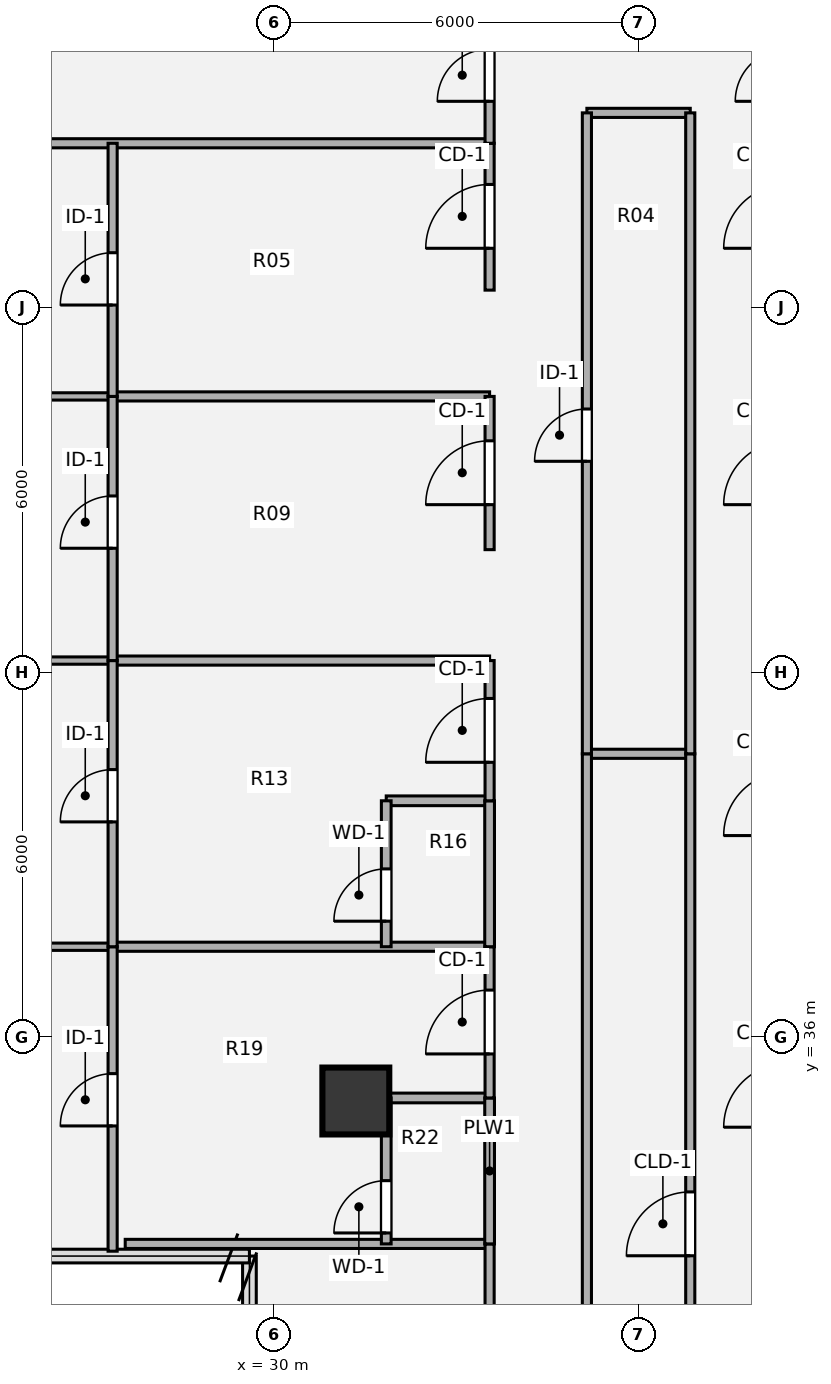
"""IFC4 building model, lengths in metres.
Left out: names, types, materials, properties, quantities, classifications, styles, units other than length and angle.
Written with IfcOpenShell. Run it as: python <this file> out.ifc"""

import sys

from ifc_helpers import new_model, si_unit, direction, frame, frame_2d, origin, origin_2d, place, context, subcontext, project, spatial, rectangle, hollow_circle, extrude, source, transform, mapped, element, fill, save


model = new_model("IFC4")
c1 = context("Model", 3, precision=1e-05, world=origin(), true_north=direction((0.0, 1.0)))
c2 = subcontext(c1, "Body", "Model", "MODEL_VIEW")
j1 = project(units=[si_unit("LENGTHUNIT", "METRE"), si_unit("PLANEANGLEUNIT", "RADIAN")], contexts=[c1])
p1 = place(None, origin())
s1 = spatial("IfcSite", under=j1, at=p1, CompositionType="ELEMENT")
p2 = place(p1, origin())
s2 = spatial("IfcBuilding", under=s1, at=p2, CompositionType="ELEMENT")
p3 = place(p2, frame((0.0, 0.0, 194.22)))
s3 = spatial("IfcBuildingStorey", under=s2, at=p3, CompositionType="ELEMENT", Elevation=194.22)
m1 = source(origin(), c2, "Body", "SweptSolid", [
    extrude(hollow_circle(Radius=0.55, WallThickness=0.04, at=origin_2d()), origin(), (0.0, 0.0, 1.0), 3.78),
])
p4 = place(p3, frame((31.35, 34.95, 0.0), z_axis=(0.0, 0.0, 1.0), x_axis=(1.0, 0.0, 0.0)))
e1 = element("IfcColumn", 1, at=p4, inside=s3, PredefinedType="COLUMN", context=c2, shape_type="MappedRepresentation", body=[
    mapped(m1, transform((0.0, 0.0, 0.0), x_axis=(1.0, 0.0, 0.0), y_axis=(0.0, 1.0, 0.0), z_axis=(0.0, 0.0, 1.0), scale=1.0)),
])
p5 = place(p3, frame((27.557, 32.6, 0.0), z_axis=(0.0, 0.0, 1.0), x_axis=(1.0, 0.0, 0.0)))
e2 = element("IfcWall", 2, at=p5, inside=s3, PredefinedType="PARTITIONING", context=c2, shape_type="SweptSolid", body=[
    extrude(rectangle(XDim=5.993, YDim=0.15, at=frame_2d((2.997, 0.0))), origin(), (0.0, 0.0, 1.0), 3.5),
])
p6 = place(p3, frame((31.85, 35.0, 0.0), z_axis=(0.0, 0.0, 1.0), x_axis=(1.0, 0.0, 0.0)))
e3 = element("IfcWall", 3, at=p6, inside=s3, PredefinedType="PLUMBINGWALL", context=c2, shape_type="SweptSolid", body=[
    extrude(rectangle(XDim=1.7, YDim=0.16, at=frame_2d((0.85, 0.0))), origin(), (0.0, 0.0, 1.0), 2.903),
])
p7 = place(p3, frame((15.88, 37.487, 0.0), z_axis=(0.0, 0.0, 1.0), x_axis=(1.0, 0.0, 0.0)))
e4 = element("IfcWall", 4, at=p7, inside=s3, PredefinedType="PARTITIONING", context=c2, shape_type="SweptSolid", body=[
    extrude(rectangle(XDim=11.47, YDim=0.12, at=frame_2d((5.735, 0.0))), origin(), (0.0, 0.0, 1.0), 3.055),
])
p8 = place(p3, frame((27.35, 37.487, 0.0), z_axis=(0.0, 0.0, 1.0), x_axis=(1.0, 0.0, 0.0)))
e5 = element("IfcWall", 5, at=p8, inside=s3, PredefinedType="PARTITIONING", context=c2, shape_type="SweptSolid", body=[
    extrude(rectangle(XDim=6.2, YDim=0.15, at=frame_2d((3.1, 0.0))), origin(), (0.0, 0.0, 1.0), 3.055),
])
p9 = place(p3, frame((31.85, 39.887, 0.0), z_axis=(0.0, 0.0, 1.0), x_axis=(1.0, 0.0, 0.0)))
e6 = element("IfcWall", 6, at=p9, inside=s3, PredefinedType="PLUMBINGWALL", context=c2, shape_type="SweptSolid", body=[
    extrude(rectangle(XDim=1.7, YDim=0.16, at=frame_2d((0.85, 0.0))), origin(), (0.0, 0.0, 1.0), 3.259),
])
p10 = place(p3, frame((35.15, 40.66, 0.0), z_axis=(0.0, 0.0, 1.0), x_axis=(1.0, 0.0, 0.0)))
e7 = element("IfcWall", 7, at=p10, inside=s3, PredefinedType="PARTITIONING", context=c2, shape_type="SweptSolid", body=[
    extrude(rectangle(XDim=1.7, YDim=0.15, at=frame_2d((0.85, 0.0))), origin(), (0.0, 0.0, 1.0), 3.259),
])
p11 = place(p3, frame((15.88, 42.193, 0.0), z_axis=(0.0, 0.0, 1.0), x_axis=(1.0, 0.0, 0.0)))
e8 = element("IfcWall", 8, at=p11, inside=s3, PredefinedType="PARTITIONING", context=c2, shape_type="SweptSolid", body=[
    extrude(rectangle(XDim=11.47, YDim=0.12, at=frame_2d((5.735, 0.0))), origin(), (0.0, 0.0, 1.0), 2.982),
])
p12 = place(p3, frame((27.35, 42.193, 0.0), z_axis=(0.0, 0.0, 1.0), x_axis=(1.0, 0.0, 0.0)))
e9 = element("IfcWall", 9, at=p12, inside=s3, PredefinedType="PARTITIONING", context=c2, shape_type="SweptSolid", body=[
    extrude(rectangle(XDim=6.2, YDim=0.15, at=frame_2d((3.1, 0.0))), origin(), (0.0, 0.0, 1.0), 2.982),
])
p13 = place(p3, frame((15.88, 46.537, 0.0), z_axis=(0.0, 0.0, 1.0), x_axis=(1.0, 0.0, 0.0)))
e10 = element("IfcWall", 10, at=p13, inside=s3, PredefinedType="PARTITIONING", context=c2, shape_type="SweptSolid", body=[
    extrude(rectangle(XDim=11.47, YDim=0.12, at=frame_2d((5.735, 0.0))), origin(), (0.0, 0.0, 1.0), 3.5),
])
p14 = place(p3, frame((27.35, 46.537, 0.0), z_axis=(0.0, 0.0, 1.0), x_axis=(1.0, 0.0, 0.0)))
e11 = element("IfcWall", 11, at=p14, inside=s3, PredefinedType="PARTITIONING", context=c2, shape_type="SweptSolid", body=[
    extrude(rectangle(XDim=6.2, YDim=0.15, at=frame_2d((3.1, 0.0))), origin(), (0.0, 0.0, 1.0), 3.259),
])
p15 = place(p3, frame((15.981, 50.7, 0.0), z_axis=(0.0, 0.0, 1.0), x_axis=(1.0, 0.0, 0.0)))
e12 = element("IfcWall", 12, at=p15, inside=s3, PredefinedType="PARTITIONING", context=c2, shape_type="SweptSolid", body=[
    extrude(rectangle(XDim=17.569, YDim=0.15, at=frame_2d((8.785, 0.0))), origin(), (0.0, 0.0, 1.0), 3.308),
])
p16 = place(p3, frame((35.15, 51.2, 0.0), z_axis=(0.0, 0.0, 1.0), x_axis=(1.0, 0.0, 0.0)))
e13 = element("IfcWall", 13, at=p16, inside=s3, PredefinedType="PARTITIONING", context=c2, shape_type="SweptSolid", body=[
    extrude(rectangle(XDim=1.7, YDim=0.15, at=frame_2d((0.85, 0.0))), origin(), (0.0, 0.0, 1.0), 3.308),
])
p17 = place(p3, frame((27.35, 32.48, 0.0), z_axis=(0.0, 0.0, 1.0), x_axis=(0.0, 1.0, 0.0)))
e14 = element("IfcWall", 14, at=p17, inside=s3, PredefinedType="PARTITIONING", context=c2, shape_type="SweptSolid", body=[
    extrude(rectangle(XDim=5.007, YDim=0.15, at=frame_2d((2.503, 0.0))), origin(), (0.0, 0.0, 1.0), 3.5),
])
p18 = place(p17, frame((2.06, 0.0, 0.0)))
e15 = element("IfcOpeningElement", 15, at=p18, cuts=e14, PredefinedType="OPENING", context=c2, shape_type="SweptSolid", body=[
    extrude(rectangle(XDim=0.86, YDim=2.1, at=origin_2d()), frame((0.43, 0.085, 1.05), z_axis=(0.0, -1.0, 0.0), x_axis=(1.0, 0.0, 0.0)), (0.0, 0.0, 1.0), 0.17),
])
p19 = place(p3, frame((27.35, 37.487, 0.0), z_axis=(0.0, 0.0, 1.0), x_axis=(0.0, 1.0, 0.0)))
e16 = element("IfcWall", 16, at=p19, inside=s3, PredefinedType="PARTITIONING", context=c2, shape_type="SweptSolid", body=[
    extrude(rectangle(XDim=4.706, YDim=0.15, at=frame_2d((2.353, 0.0))), origin(), (0.0, 0.0, 1.0), 3.5),
])
p20 = place(p19, frame((2.053, 0.0, 0.0)))
e17 = element("IfcOpeningElement", 17, at=p20, cuts=e16, PredefinedType="OPENING", context=c2, shape_type="SweptSolid", body=[
    extrude(rectangle(XDim=0.86, YDim=2.1, at=origin_2d()), frame((0.43, 0.085, 1.05), z_axis=(0.0, -1.0, 0.0), x_axis=(1.0, 0.0, 0.0)), (0.0, 0.0, 1.0), 0.17),
])
p21 = place(p3, frame((27.35, 42.193, 0.0), z_axis=(0.0, 0.0, 1.0), x_axis=(0.0, 1.0, 0.0)))
e18 = element("IfcWall", 18, at=p21, inside=s3, PredefinedType="PARTITIONING", context=c2, shape_type="SweptSolid", body=[
    extrude(rectangle(XDim=4.344, YDim=0.15, at=frame_2d((2.172, 0.0))), origin(), (0.0, 0.0, 1.0), 3.5),
])
p22 = place(p21, frame((1.847, 0.0, 0.0)))
e19 = element("IfcOpeningElement", 19, at=p22, cuts=e18, PredefinedType="OPENING", context=c2, shape_type="SweptSolid", body=[
    extrude(rectangle(XDim=0.86, YDim=2.1, at=origin_2d()), frame((0.43, 0.085, 1.05), z_axis=(0.0, -1.0, 0.0), x_axis=(1.0, 0.0, 0.0)), (0.0, 0.0, 1.0), 0.17),
])
p23 = place(p3, frame((27.35, 46.537, 0.0), z_axis=(0.0, 0.0, 1.0), x_axis=(0.0, 1.0, 0.0)))
e20 = element("IfcWall", 20, at=p23, inside=s3, PredefinedType="PARTITIONING", context=c2, shape_type="SweptSolid", body=[
    extrude(rectangle(XDim=4.163, YDim=0.15, at=frame_2d((2.082, 0.0))), origin(), (0.0, 0.0, 1.0), 3.5),
])
p24 = place(p23, frame((1.503, 0.0, 0.0)))
e21 = element("IfcOpeningElement", 21, at=p24, cuts=e20, PredefinedType="OPENING", context=c2, shape_type="SweptSolid", body=[
    extrude(rectangle(XDim=0.86, YDim=2.1, at=origin_2d()), frame((0.43, 0.085, 1.05), z_axis=(0.0, -1.0, 0.0), x_axis=(1.0, 0.0, 0.0)), (0.0, 0.0, 1.0), 0.17),
])
p25 = place(p3, frame((31.85, 32.6, 0.0), z_axis=(0.0, 0.0, 1.0), x_axis=(0.0, 1.0, 0.0)))
e22 = element("IfcWall", 22, at=p25, inside=s3, PredefinedType="PLUMBINGWALL", context=c2, shape_type="SweptSolid", body=[
    extrude(rectangle(XDim=2.4, YDim=0.16, at=frame_2d((1.2, 0.0))), origin(), (0.0, 0.0, 1.0), 3.5),
])
p26 = place(p25, frame((0.18, 0.0, 0.0)))
e23 = element("IfcOpeningElement", 23, at=p26, cuts=e22, PredefinedType="OPENING", context=c2, shape_type="SweptSolid", body=[
    extrude(rectangle(XDim=0.86, YDim=2.1, at=origin_2d()), frame((0.43, 0.09, 1.05), z_axis=(0.0, -1.0, 0.0), x_axis=(1.0, 0.0, 0.0)), (0.0, 0.0, 1.0), 0.18),
])
p27 = place(p3, frame((31.85, 37.487, 0.0), z_axis=(0.0, 0.0, 1.0), x_axis=(0.0, 1.0, 0.0)))
e24 = element("IfcWall", 24, at=p27, inside=s3, PredefinedType="PLUMBINGWALL", context=c2, shape_type="SweptSolid", body=[
    extrude(rectangle(XDim=2.4, YDim=0.16, at=frame_2d((1.2, 0.0))), origin(), (0.0, 0.0, 1.0), 3.5),
])
p28 = place(p27, frame((0.42, 0.0, 0.0)))
e25 = element("IfcOpeningElement", 25, at=p28, cuts=e24, PredefinedType="OPENING", context=c2, shape_type="SweptSolid", body=[
    extrude(rectangle(XDim=0.86, YDim=2.1, at=origin_2d()), frame((0.43, 0.09, 1.05), z_axis=(0.0, -1.0, 0.0), x_axis=(1.0, 0.0, 0.0)), (0.0, 0.0, 1.0), 0.18),
])
p29 = place(p3, frame((33.55, 21.2, 0.0), z_axis=(0.0, 0.0, 1.0), x_axis=(0.0, 1.0, 0.0)))
e26 = element("IfcWall", 26, at=p29, inside=s3, PredefinedType="PARTITIONING", context=c2, shape_type="SweptSolid", body=[
    extrude(rectangle(XDim=11.4, YDim=0.15, at=frame_2d((5.7, 0.0))), origin(), (0.0, 0.0, 1.0), 3.5),
])
p30 = place(p29, frame((5.14, 0.0, 0.0)))
e27 = element("IfcOpeningElement", 27, at=p30, cuts=e26, PredefinedType="OPENING", context=c2, shape_type="SweptSolid", body=[
    extrude(rectangle(XDim=0.86, YDim=2.1, at=origin_2d()), frame((0.43, 0.085, 1.05), z_axis=(0.0, -1.0, 0.0), x_axis=(1.0, 0.0, 0.0)), (0.0, 0.0, 1.0), 0.17),
])
p31 = place(p3, frame((33.55, 32.6, 0.0), z_axis=(0.0, 0.0, 1.0), x_axis=(0.0, 1.0, 0.0)))
e28 = element("IfcWall", 28, at=p31, inside=s3, PredefinedType="PLUMBINGWALL", context=c2, shape_type="SweptSolid", body=[
    extrude(rectangle(XDim=2.4, YDim=0.16, at=frame_2d((1.2, 0.0))), origin(), (0.0, 0.0, 1.0), 3.5),
])
p32 = place(p3, frame((33.55, 35.0, 0.0), z_axis=(0.0, 0.0, 1.0), x_axis=(0.0, 1.0, 0.0)))
e29 = element("IfcWall", 29, at=p32, inside=s3, PredefinedType="PARTITIONING", context=c2, shape_type="SweptSolid", body=[
    extrude(rectangle(XDim=2.487, YDim=0.15, at=frame_2d((1.244, 0.0))), origin(), (0.0, 0.0, 1.0), 3.5),
])
p33 = place(p32, frame((0.724, 0.0, 0.0)))
e30 = element("IfcOpeningElement", 30, at=p33, cuts=e29, PredefinedType="OPENING", context=c2, shape_type="SweptSolid", body=[
    extrude(rectangle(XDim=1.05, YDim=2.1, at=origin_2d()), frame((0.525, 0.085, 1.05), z_axis=(0.0, -1.0, 0.0), x_axis=(1.0, 0.0, 0.0)), (0.0, 0.0, 1.0), 0.17),
])
p34 = place(p3, frame((33.55, 37.487, 0.0), z_axis=(0.0, 0.0, 1.0), x_axis=(0.0, 1.0, 0.0)))
e31 = element("IfcWall", 31, at=p34, inside=s3, PredefinedType="PLUMBINGWALL", context=c2, shape_type="SweptSolid", body=[
    extrude(rectangle(XDim=2.4, YDim=0.16, at=frame_2d((1.2, 0.0))), origin(), (0.0, 0.0, 1.0), 3.5),
])
p35 = place(p3, frame((33.55, 39.887, 0.0), z_axis=(0.0, 0.0, 1.0), x_axis=(0.0, 1.0, 0.0)))
e32 = element("IfcWall", 32, at=p35, inside=s3, PredefinedType="PARTITIONING", context=c2, shape_type="SweptSolid", body=[
    extrude(rectangle(XDim=2.306, YDim=0.15, at=frame_2d((1.153, 0.0))), origin(), (0.0, 0.0, 1.0), 3.5),
])
p36 = place(p35, frame((0.633, 0.0, 0.0)))
e33 = element("IfcOpeningElement", 33, at=p36, cuts=e32, PredefinedType="OPENING", context=c2, shape_type="SweptSolid", body=[
    extrude(rectangle(XDim=1.05, YDim=2.1, at=origin_2d()), frame((0.525, 0.085, 1.05), z_axis=(0.0, -1.0, 0.0), x_axis=(1.0, 0.0, 0.0)), (0.0, 0.0, 1.0), 0.17),
])
p37 = place(p3, frame((33.55, 44.017, 0.0), z_axis=(0.0, 0.0, 1.0), x_axis=(0.0, 1.0, 0.0)))
e34 = element("IfcWall", 34, at=p37, inside=s3, PredefinedType="PARTITIONING", context=c2, shape_type="SweptSolid", body=[
    extrude(rectangle(XDim=2.52, YDim=0.15, at=frame_2d((1.26, 0.0))), origin(), (0.0, 0.0, 1.0), 3.5),
])
p38 = place(p37, frame((0.74, 0.0, 0.0)))
e35 = element("IfcOpeningElement", 35, at=p38, cuts=e34, PredefinedType="OPENING", context=c2, shape_type="SweptSolid", body=[
    extrude(rectangle(XDim=1.05, YDim=2.1, at=origin_2d()), frame((0.525, 0.085, 1.05), z_axis=(0.0, -1.0, 0.0), x_axis=(1.0, 0.0, 0.0)), (0.0, 0.0, 1.0), 0.17),
])
p39 = place(p3, frame((33.55, 48.285, 0.0), z_axis=(0.0, 0.0, 1.0), x_axis=(0.0, 1.0, 0.0)))
e36 = element("IfcWall", 36, at=p39, inside=s3, PredefinedType="PARTITIONING", context=c2, shape_type="SweptSolid", body=[
    extrude(rectangle(XDim=2.415, YDim=0.15, at=frame_2d((1.208, 0.0))), origin(), (0.0, 0.0, 1.0), 3.5),
])
p40 = place(p39, frame((0.688, 0.0, 0.0)))
e37 = element("IfcOpeningElement", 37, at=p40, cuts=e36, PredefinedType="OPENING", context=c2, shape_type="SweptSolid", body=[
    extrude(rectangle(XDim=1.05, YDim=2.1, at=origin_2d()), frame((0.525, 0.085, 1.05), z_axis=(0.0, -1.0, 0.0), x_axis=(1.0, 0.0, 0.0)), (0.0, 0.0, 1.0), 0.17),
])
p41 = place(p3, frame((33.55, 50.7, 0.0), z_axis=(0.0, 0.0, 1.0), x_axis=(0.0, 1.0, 0.0)))
e38 = element("IfcWall", 38, at=p41, inside=s3, PredefinedType="PARTITIONING", context=c2, shape_type="SweptSolid", body=[
    extrude(rectangle(XDim=2.3, YDim=0.15, at=frame_2d((1.15, 0.0))), origin(), (0.0, 0.0, 1.0), 3.5),
])
p42 = place(p41, frame((0.69, 0.0, 0.0)))
e39 = element("IfcOpeningElement", 39, at=p42, cuts=e38, PredefinedType="OPENING", context=c2, shape_type="SweptSolid", body=[
    extrude(rectangle(XDim=0.86, YDim=2.1, at=origin_2d()), frame((0.43, 0.085, 1.05), z_axis=(0.0, -1.0, 0.0), x_axis=(1.0, 0.0, 0.0)), (0.0, 0.0, 1.0), 0.17),
])
p43 = place(p3, frame((35.15, 25.2, 0.0), z_axis=(0.0, 0.0, 1.0), x_axis=(0.0, 1.0, 0.0)))
e40 = element("IfcWall", 40, at=p43, inside=s3, PredefinedType="PARTITIONING", context=c2, shape_type="SweptSolid", body=[
    extrude(rectangle(XDim=15.46, YDim=0.15, at=frame_2d((7.73, 0.0))), origin(), (0.0, 0.0, 1.0), 3.5),
])
p44 = place(p3, frame((35.15, 40.66, 0.0), z_axis=(0.0, 0.0, 1.0), x_axis=(0.0, 1.0, 0.0)))
e41 = element("IfcWall", 41, at=p44, inside=s3, PredefinedType="PARTITIONING", context=c2, shape_type="SweptSolid", body=[
    extrude(rectangle(XDim=10.54, YDim=0.15, at=frame_2d((5.27, 0.0))), origin(), (0.0, 0.0, 1.0), 3.5),
])
p45 = place(p44, frame((4.81, 0.0, 0.0)))
e42 = element("IfcOpeningElement", 42, at=p45, cuts=e41, PredefinedType="OPENING", context=c2, shape_type="SweptSolid", body=[
    extrude(rectangle(XDim=0.86, YDim=2.1, at=origin_2d()), frame((0.43, 0.085, 1.05), z_axis=(0.0, -1.0, 0.0), x_axis=(1.0, 0.0, 0.0)), (0.0, 0.0, 1.0), 0.17),
])
p46 = place(p3, frame((36.85, 25.2, 0.0), z_axis=(0.0, 0.0, 1.0), x_axis=(0.0, 1.0, 0.0)))
e43 = element("IfcWall", 43, at=p46, inside=s3, PredefinedType="PARTITIONING", context=c2, shape_type="SweptSolid", body=[
    extrude(rectangle(XDim=15.46, YDim=0.15, at=frame_2d((7.73, 0.0))), origin(), (0.0, 0.0, 1.0), 3.5),
])
p47 = place(p46, frame((7.205, 0.0, 0.0)))
e44 = element("IfcOpeningElement", 44, at=p47, cuts=e43, PredefinedType="OPENING", context=c2, shape_type="SweptSolid", body=[
    extrude(rectangle(XDim=1.05, YDim=2.1, at=origin_2d()), frame((0.525, 0.085, 1.05), z_axis=(0.0, -1.0, 0.0), x_axis=(1.0, 0.0, 0.0)), (0.0, 0.0, 1.0), 0.17),
])
p48 = place(p3, frame((36.85, 40.66, 0.0), z_axis=(0.0, 0.0, 1.0), x_axis=(0.0, 1.0, 0.0)))
e45 = element("IfcWall", 45, at=p48, inside=s3, PredefinedType="PARTITIONING", context=c2, shape_type="SweptSolid", body=[
    extrude(rectangle(XDim=10.54, YDim=0.15, at=frame_2d((5.27, 0.0))), origin(), (0.0, 0.0, 1.0), 3.5),
])
m2 = source(origin(), c2, "Body", "SweptSolid", [
    extrude(rectangle(XDim=0.86, YDim=2.1, at=origin_2d()), frame((0.43, 0.025, 1.05), z_axis=(0.0, -1.0, 0.0), x_axis=(1.0, 0.0, 0.0)), (0.0, 0.0, 1.0), 0.05),
])
p49 = place(p18, origin())
e46 = element("IfcDoor", 46, at=p49, inside=s3, OperationType="SINGLE_SWING_LEFT", PredefinedType="DOOR", context=c2, shape_type="MappedRepresentation", body=[
    mapped(m2, transform((0.0, 0.0, 0.0), x_axis=(1.0, 0.0, 0.0), y_axis=(0.0, 1.0, 0.0), z_axis=(0.0, 0.0, 1.0), scale=1.0)),
])
fill(e15, e46)
p50 = place(p20, origin())
e47 = element("IfcDoor", 47, at=p50, inside=s3, OperationType="SINGLE_SWING_LEFT", PredefinedType="DOOR", context=c2, shape_type="MappedRepresentation", body=[
    mapped(m2, transform((0.0, 0.0, 0.0), x_axis=(1.0, 0.0, 0.0), y_axis=(0.0, 1.0, 0.0), z_axis=(0.0, 0.0, 1.0), scale=1.0)),
])
fill(e17, e47)
p51 = place(p22, origin())
e48 = element("IfcDoor", 48, at=p51, inside=s3, OperationType="SINGLE_SWING_LEFT", PredefinedType="DOOR", context=c2, shape_type="MappedRepresentation", body=[
    mapped(m2, transform((0.0, 0.0, 0.0), x_axis=(1.0, 0.0, 0.0), y_axis=(0.0, 1.0, 0.0), z_axis=(0.0, 0.0, 1.0), scale=1.0)),
])
fill(e19, e48)
p52 = place(p24, origin())
e49 = element("IfcDoor", 49, at=p52, inside=s3, OperationType="SINGLE_SWING_LEFT", PredefinedType="DOOR", context=c2, shape_type="MappedRepresentation", body=[
    mapped(m2, transform((0.0, 0.0, 0.0), x_axis=(1.0, 0.0, 0.0), y_axis=(0.0, 1.0, 0.0), z_axis=(0.0, 0.0, 1.0), scale=1.0)),
])
fill(e21, e49)
m3 = source(origin(), c2, "Body", "SweptSolid", [
    extrude(rectangle(XDim=0.86, YDim=2.1, at=origin_2d()), frame((0.43, 0.025, 1.05), z_axis=(0.0, -1.0, 0.0), x_axis=(1.0, 0.0, 0.0)), (0.0, 0.0, 1.0), 0.05),
])
p53 = place(p26, origin())
e50 = element("IfcDoor", 50, at=p53, inside=s3, OperationType="SINGLE_SWING_LEFT", PredefinedType="DOOR", context=c2, shape_type="MappedRepresentation", body=[
    mapped(m3, transform((0.0, 0.0, 0.0), x_axis=(1.0, 0.0, 0.0), y_axis=(0.0, 1.0, 0.0), z_axis=(0.0, 0.0, 1.0), scale=1.0)),
])
fill(e23, e50)
p54 = place(p28, origin())
e51 = element("IfcDoor", 51, at=p54, inside=s3, OperationType="SINGLE_SWING_LEFT", PredefinedType="DOOR", context=c2, shape_type="MappedRepresentation", body=[
    mapped(m3, transform((0.0, 0.0, 0.0), x_axis=(1.0, 0.0, 0.0), y_axis=(0.0, 1.0, 0.0), z_axis=(0.0, 0.0, 1.0), scale=1.0)),
])
fill(e25, e51)
m4 = source(origin(), c2, "Body", "SweptSolid", [
    extrude(rectangle(XDim=1.05, YDim=2.1, at=origin_2d()), frame((0.525, 0.025, 1.05), z_axis=(0.0, -1.0, 0.0), x_axis=(1.0, 0.0, 0.0)), (0.0, 0.0, 1.0), 0.05),
])
p55 = place(p33, origin())
e52 = element("IfcDoor", 52, at=p55, inside=s3, OperationType="SINGLE_SWING_LEFT", PredefinedType="DOOR", context=c2, shape_type="MappedRepresentation", body=[
    mapped(m4, transform((0.0, 0.0, 0.0), x_axis=(1.0, 0.0, 0.0), y_axis=(0.0, 1.0, 0.0), z_axis=(0.0, 0.0, 1.0), scale=1.0)),
])
fill(e30, e52)
p56 = place(p36, origin())
e53 = element("IfcDoor", 53, at=p56, inside=s3, OperationType="SINGLE_SWING_LEFT", PredefinedType="DOOR", context=c2, shape_type="MappedRepresentation", body=[
    mapped(m4, transform((0.0, 0.0, 0.0), x_axis=(1.0, 0.0, 0.0), y_axis=(0.0, 1.0, 0.0), z_axis=(0.0, 0.0, 1.0), scale=1.0)),
])
fill(e33, e53)
p57 = place(p38, origin())
e54 = element("IfcDoor", 54, at=p57, inside=s3, OperationType="SINGLE_SWING_LEFT", PredefinedType="DOOR", context=c2, shape_type="MappedRepresentation", body=[
    mapped(m4, transform((0.0, 0.0, 0.0), x_axis=(1.0, 0.0, 0.0), y_axis=(0.0, 1.0, 0.0), z_axis=(0.0, 0.0, 1.0), scale=1.0)),
])
fill(e35, e54)
p58 = place(p40, origin())
e55 = element("IfcDoor", 55, at=p58, inside=s3, OperationType="SINGLE_SWING_LEFT", PredefinedType="DOOR", context=c2, shape_type="MappedRepresentation", body=[
    mapped(m4, transform((0.0, 0.0, 0.0), x_axis=(1.0, 0.0, 0.0), y_axis=(0.0, 1.0, 0.0), z_axis=(0.0, 0.0, 1.0), scale=1.0)),
])
fill(e37, e55)
p59 = place(p42, origin())
e56 = element("IfcDoor", 56, at=p59, inside=s3, OperationType="SINGLE_SWING_LEFT", PredefinedType="DOOR", context=c2, shape_type="MappedRepresentation", body=[
    mapped(m2, transform((0.0, 0.0, 0.0), x_axis=(1.0, 0.0, 0.0), y_axis=(0.0, 1.0, 0.0), z_axis=(0.0, 0.0, 1.0), scale=1.0)),
])
fill(e39, e56)
p60 = place(p45, origin())
e57 = element("IfcDoor", 57, at=p60, inside=s3, OperationType="SINGLE_SWING_LEFT", PredefinedType="DOOR", context=c2, shape_type="MappedRepresentation", body=[
    mapped(m2, transform((0.0, 0.0, 0.0), x_axis=(1.0, 0.0, 0.0), y_axis=(0.0, 1.0, 0.0), z_axis=(0.0, 0.0, 1.0), scale=1.0)),
])
fill(e42, e57)
m5 = source(origin(), c2, "Body", "SweptSolid", [
    extrude(rectangle(XDim=1.05, YDim=2.1, at=origin_2d()), frame((0.525, 0.025, 1.05), z_axis=(0.0, -1.0, 0.0), x_axis=(1.0, 0.0, 0.0)), (0.0, 0.0, 1.0), 0.05),
])
p61 = place(p47, origin())
e58 = element("IfcDoor", 58, at=p61, inside=s3, OperationType="SINGLE_SWING_LEFT", PredefinedType="DOOR", context=c2, shape_type="MappedRepresentation", body=[
    mapped(m5, transform((0.0, 0.0, 0.0), x_axis=(1.0, 0.0, 0.0), y_axis=(0.0, 1.0, 0.0), z_axis=(0.0, 0.0, 1.0), scale=1.0)),
])
fill(e44, e58)
save(model, sys.argv[1])
